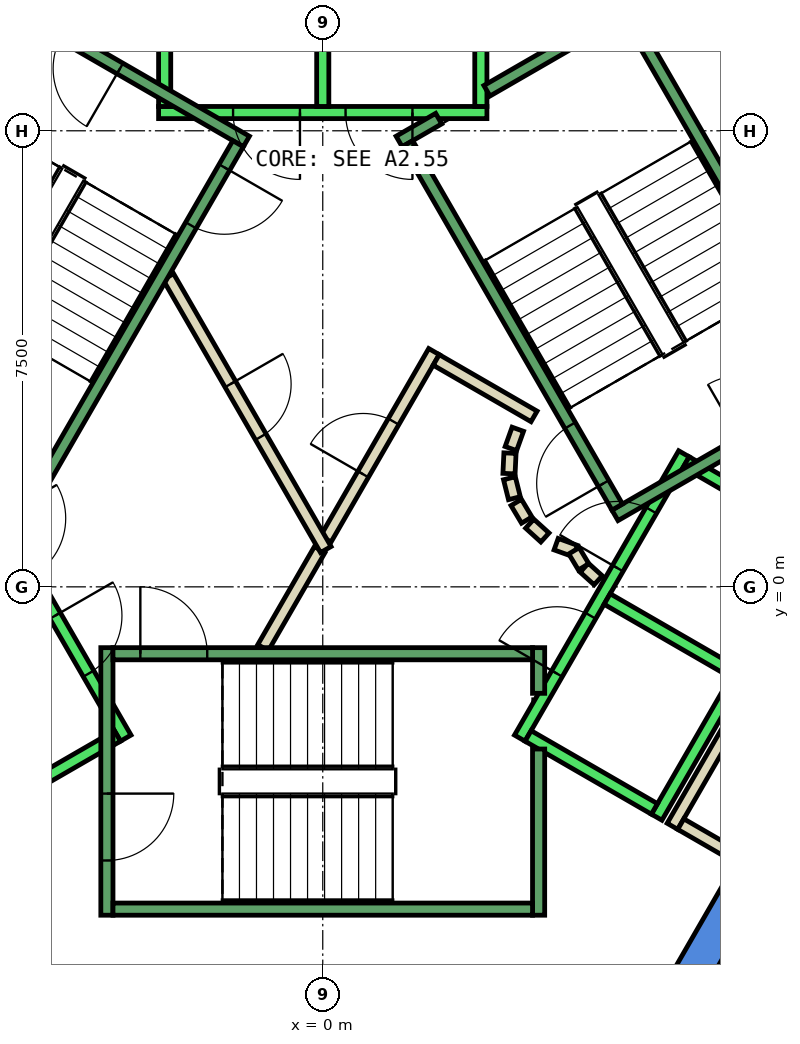
"""IFC4 building model, lengths in metres.
Left out: names, types, materials, properties, quantities, classifications, styles, units other than length and angle.
Written with IfcOpenShell. Run it as: python <this file> out.ifc"""

import sys

from ifc_helpers import new_model, si_unit, direction, frame, frame_2d, origin, place, context, subcontext, project, spatial, polyline, rectangle, outline, extrude, element, fill, save


model = new_model("IFC4")
c1 = context("Model", 3, precision=1e-05, world=origin(), true_north=direction((0.0, 1.0)))
c2 = subcontext(c1, "Body", "Model", "MODEL_VIEW")
j1 = project(units=[si_unit("LENGTHUNIT", "METRE"), si_unit("PLANEANGLEUNIT", "RADIAN")], contexts=[c1])
p1 = place(None, origin())
s1 = spatial("IfcSite", under=j1, at=p1, CompositionType="ELEMENT")
p2 = place(p1, origin())
s2 = spatial("IfcBuilding", under=s1, at=p2, CompositionType="ELEMENT")
p3 = place(p2, frame((0.0, 0.0, 263.0)))
s3 = spatial("IfcBuildingStorey", under=s2, at=p3, CompositionType="ELEMENT", Elevation=263.0)
p4 = place(p3, frame((0.0, 0.0, -0.34)))
e1 = element("IfcWall", 1, at=p4, inside=s3, PredefinedType="SHEAR", context=c2, shape_type="SweptSolid", body=[
    extrude(outline(polyline([(6.786, 10.747), (6.266, 10.447), (10.854, 2.5), (11.547, 2.5), (6.786, 10.747)])), origin(), (0.0, 0.0, 1.0), 3.6),
])
p5 = place(p3, frame((0.0, 0.0, -0.34)))
e2 = element("IfcWall", 2, at=p5, inside=s3, PredefinedType="SHEAR", context=c2, shape_type="SweptSolid", body=[
    extrude(outline(polyline([(5.774, -7.5), (11.547, 2.5), (10.854, 2.5), (5.427, -6.9), (5.774, -7.5)])), origin(), (0.0, 0.0, 1.0), 3.6),
])
p6 = place(p3, frame((5.751, -3.938, 0.0), z_axis=(0.0, 0.0, 1.0), x_axis=(0.500034260056, 0.866005622828, 0.0)))
e3 = element("IfcWall", 3, at=p6, inside=s3, PredefinedType="PARTITIONING", context=c2, shape_type="SweptSolid", body=[
    extrude(rectangle(XDim=5.399, YDim=0.2, at=frame_2d((2.7, 0.0))), origin(), (0.0, 0.0, 1.0), 3.26),
])
p7 = place(p3, frame((6.841, -4.452, 0.0), z_axis=(0.0, 0.0, 1.0), x_axis=(-0.86621513555, 0.499671230855, 0.0)))
e4 = element("IfcWall", 4, at=p7, inside=s3, PredefinedType="PARTITIONING", context=c2, shape_type="SweptSolid", body=[
    extrude(rectangle(XDim=1.1, YDim=0.2, at=frame_2d((0.55, 0.0))), origin(), (0.0, 0.0, 1.0), 3.26),
])
p8 = place(p3, frame((-0.982, -1.0, 0.0), z_axis=(0.0, 0.0, 1.0), x_axis=(0.50024047865, 0.865886518847, 0.0)))
e5 = element("IfcWall", 5, at=p8, inside=s3, PredefinedType="PARTITIONING", context=c2, shape_type="SweptSolid", body=[
    extrude(rectangle(XDim=1.863, YDim=0.2, at=frame_2d((0.931, 0.0))), origin(), (0.0, 0.0, 1.0), 3.26),
])
p9 = place(p3, frame((0.05, 0.787, 0.0), z_axis=(0.0, 0.0, 1.0), x_axis=(0.499954076797, 0.866051915934, 0.0)))
e6 = element("IfcWall", 6, at=p9, inside=s3, PredefinedType="PARTITIONING", context=c2, shape_type="SweptSolid", body=[
    extrude(rectangle(XDim=3.558, YDim=0.2, at=frame_2d((1.779, 0.0))), origin(), (0.0, 0.0, 1.0), 3.26),
])
p10 = place(p9, frame((1.229, 0.0, 0.0)))
e7 = element("IfcOpeningElement", 7, at=p10, cuts=e6, PredefinedType="OPENING", context=c2, shape_type="SweptSolid", body=[
    extrude(rectangle(XDim=1.0, YDim=2.1, at=frame_2d((0.5, 1.05))), frame((0.0, 0.11, 0.0), z_axis=(0.0, -1.0, 0.0), x_axis=(1.0, 0.0, 0.0)), (0.0, 0.0, 1.0), 0.22),
])
p11 = place(p3, frame((1.866, 3.732, 0.0), z_axis=(0.0, 0.0, 1.0), x_axis=(0.866043361281, -0.499968895414, 0.0)))
e8 = element("IfcWall", 8, at=p11, inside=s3, PredefinedType="PARTITIONING", context=c2, shape_type="SweptSolid", body=[
    extrude(rectangle(XDim=1.858, YDim=0.2, at=frame_2d((0.929, 0.0))), origin(), (0.0, 0.0, 1.0), 3.26),
])
p12 = place(p3, frame((3.208, 2.592, 0.0), z_axis=(0.0, 0.0, 1.0), x_axis=(-0.337388820924, -0.941365382578, 0.0)))
e9 = element("IfcWall", 9, at=p12, inside=s3, PredefinedType="PARTITIONING", context=c2, shape_type="SweptSolid", body=[
    extrude(rectangle(XDim=0.338, YDim=0.2, at=frame_2d((0.169, 0.0))), origin(), (0.0, 0.0, 1.0), 3.26),
])
p13 = place(p3, frame((3.079, 2.199, 0.0), z_axis=(0.0, 0.0, 1.0), x_axis=(-0.047771483479, -0.998858290933, 0.0)))
e10 = element("IfcWall", 10, at=p13, inside=s3, PredefinedType="PARTITIONING", context=c2, shape_type="SweptSolid", body=[
    extrude(rectangle(XDim=0.337, YDim=0.2, at=frame_2d((0.169, 0.0))), origin(), (0.0, 0.0, 1.0), 3.26),
])
p14 = place(p3, frame((3.07, 1.786, 0.0), z_axis=(0.0, 0.0, 1.0), x_axis=(0.242705583207, -0.970099994784, 0.0)))
e11 = element("IfcWall", 11, at=p14, inside=s3, PredefinedType="PARTITIONING", context=c2, shape_type="SweptSolid", body=[
    extrude(rectangle(XDim=0.338, YDim=0.2, at=frame_2d((0.169, 0.0))), origin(), (0.0, 0.0, 1.0), 3.26),
])
for number, where, z_axis, x_axis in (
    (12, (3.182, 1.388, 0.0), (0.0, 0.0, 1.0), (0.512, -0.859, 0.0)),
    (13, (3.404, 1.039, 0.0), (0.0, 0.0, 1.0), (0.74, -0.672, 0.0)),
):
    element("IfcWall", number, at=place(p3, frame(where, z_axis=z_axis, x_axis=x_axis)), inside=s3, PredefinedType="PARTITIONING", context=c2, shape_type="SweptSolid", body=[
        extrude(rectangle(XDim=0.338, YDim=0.2, at=frame_2d((0.169, 0.0))), origin(), (0.0, 0.0, 1.0), 3.26),
    ])
p15 = place(p3, frame((3.838, 0.702, 0.0), z_axis=(0.0, 0.0, 1.0), x_axis=(0.941035081519, -0.338308993895, 0.0)))
e14 = element("IfcWall", 14, at=p15, inside=s3, PredefinedType="PARTITIONING", context=c2, shape_type="SweptSolid", body=[
    extrude(rectangle(XDim=0.337, YDim=0.2, at=frame_2d((0.168, 0.0))), origin(), (0.0, 0.0, 1.0), 3.26),
])
p16 = place(p3, frame((4.132, 0.593, 0.0), z_axis=(0.0, 0.0, 1.0), x_axis=(0.513561617048, -0.858052717201, 0.0)))
e15 = element("IfcWall", 15, at=p16, inside=s3, PredefinedType="PARTITIONING", context=c2, shape_type="SweptSolid", body=[
    extrude(rectangle(XDim=0.308, YDim=0.2, at=frame_2d((0.154, 0.0))), origin(), (0.0, 0.0, 1.0), 3.26),
])
p17 = place(p3, frame((4.301, 0.315, 0.0), z_axis=(0.0, 0.0, 1.0), x_axis=(0.741798017506, -0.670623367639, 0.0)))
e16 = element("IfcWall", 16, at=p17, inside=s3, PredefinedType="PARTITIONING", context=c2, shape_type="SweptSolid", body=[
    extrude(rectangle(XDim=0.309, YDim=0.2, at=frame_2d((0.154, 0.0))), origin(), (0.0, 0.0, 1.0), 3.26),
])
p18 = place(p3, frame((-2.54, 5.1, 0.0), z_axis=(0.0, 0.0, 1.0), x_axis=(0.499925051871, -0.866068670783, 0.0)))
e17 = element("IfcWall", 17, at=p18, inside=s3, PredefinedType="PARTITIONING", context=c2, shape_type="SweptSolid", body=[
    extrude(rectangle(XDim=5.181, YDim=0.2, at=frame_2d((2.59, 0.0))), origin(), (0.0, 0.0, 1.0), 3.26),
])
p19 = place(p18, frame((2.04, 0.0, 0.0)))
e18 = element("IfcOpeningElement", 18, at=p19, cuts=e17, PredefinedType="OPENING", context=c2, shape_type="SweptSolid", body=[
    extrude(rectangle(XDim=1.0, YDim=2.1, at=frame_2d((0.5, 1.05))), frame((0.0, 0.11, 0.0), z_axis=(0.0, -1.0, 0.0), x_axis=(1.0, 0.0, 0.0)), (0.0, 0.0, 1.0), 0.22),
])
p20 = place(p3, frame((2.7, 7.8, 0.0), z_axis=(0.0, 0.0, 1.0), x_axis=(-1.0, 0.0, 0.0)))
e19 = element("IfcWall", 19, at=p20, inside=s3, PredefinedType="STANDARD", context=c2, shape_type="SweptSolid", body=[
    extrude(rectangle(XDim=5.4, YDim=0.2, at=frame_2d((2.7, 0.0))), origin(), (0.0, 0.0, 1.0), 3.26),
])
p21 = place(p20, frame((1.225, 0.0, 0.0)))
e20 = element("IfcOpeningElement", 20, at=p21, cuts=e19, PredefinedType="OPENING", context=c2, shape_type="SweptSolid", body=[
    extrude(rectangle(XDim=1.1, YDim=2.1, at=frame_2d((0.55, 1.05))), frame((0.0, 0.11, 0.0), z_axis=(0.0, -1.0, 0.0), x_axis=(1.0, 0.0, 0.0)), (0.0, 0.0, 1.0), 0.22),
])
p22 = place(p20, frame((3.075, 0.0, 0.0)))
e21 = element("IfcOpeningElement", 21, at=p22, cuts=e19, PredefinedType="OPENING", context=c2, shape_type="SweptSolid", body=[
    extrude(rectangle(XDim=1.1, YDim=2.1, at=frame_2d((0.55, 1.05))), frame((0.0, 0.11, 0.0), z_axis=(0.0, -1.0, 0.0), x_axis=(1.0, 0.0, 0.0)), (0.0, 0.0, 1.0), 0.22),
])
for number, where, z_axis, x_axis in (
    (22, (2.6, 7.9, 0.0), (0.0, 0.0, 1.0), (0.0, 1.0, 0.0)),
    (23, (0.0, 7.9, 0.0), (0.0, 0.0, 1.0), (0.0, 1.0, 0.0)),
    (24, (-2.6, 7.9, 0.0), (0.0, 0.0, 1.0), (0.0, 1.0, 0.0)),
):
    element("IfcWall", number, at=place(p3, frame(where, z_axis=z_axis, x_axis=x_axis)), inside=s3, PredefinedType="STANDARD", context=c2, shape_type="SweptSolid", body=[
        extrude(rectangle(XDim=2.4, YDim=0.2, at=frame_2d((1.2, 0.0))), origin(), (0.0, 0.0, 1.0), 3.26),
    ])
p23 = place(p3, frame((-5.94, 2.188, 0.0), z_axis=(0.0, 0.0, 1.0), x_axis=(0.500034260056, -0.866005622828, 0.0)))
e25 = element("IfcWall", 25, at=p23, inside=s3, PredefinedType="STANDARD", context=c2, shape_type="SweptSolid", body=[
    extrude(rectangle(XDim=5.399, YDim=0.2, at=frame_2d((2.7, 0.0))), origin(), (0.0, 0.0, 1.0), 3.26),
])
p24 = place(p23, frame((3.075, 0.0, 0.0)))
e26 = element("IfcOpeningElement", 26, at=p24, cuts=e25, PredefinedType="OPENING", context=c2, shape_type="SweptSolid", body=[
    extrude(rectangle(XDim=1.1, YDim=2.1, at=frame_2d((0.55, 1.05))), frame((0.0, 0.11, 0.0), z_axis=(0.0, -1.0, 0.0), x_axis=(1.0, 0.0, 0.0)), (0.0, 0.0, 1.0), 0.22),
])
p25 = place(p23, frame((1.225, 0.0, 0.0)))
e27 = element("IfcOpeningElement", 27, at=p25, cuts=e25, PredefinedType="OPENING", context=c2, shape_type="SweptSolid", body=[
    extrude(rectangle(XDim=1.1, YDim=2.1, at=frame_2d((0.55, 1.05))), frame((0.0, 0.11, 0.0), z_axis=(0.0, -1.0, 0.0), x_axis=(1.0, 0.0, 0.0)), (0.0, 0.0, 1.0), 0.22),
])
p26 = place(p3, frame((-3.377, -2.452, 0.0), z_axis=(0.0, 0.0, 1.0), x_axis=(-0.865955154139, -0.50012165622, 0.0)))
e28 = element("IfcWall", 28, at=p26, inside=s3, PredefinedType="STANDARD", context=c2, shape_type="SweptSolid", body=[
    extrude(rectangle(XDim=2.4, YDim=0.2, at=frame_2d((1.2, 0.0))), origin(), (0.0, 0.0, 1.0), 3.26),
])
p27 = place(p3, frame((3.24, -2.488, 0.0), z_axis=(0.0, 0.0, 1.0), x_axis=(0.500034260056, 0.866005622828, 0.0)))
e29 = element("IfcWall", 29, at=p27, inside=s3, PredefinedType="STANDARD", context=c2, shape_type="SweptSolid", body=[
    extrude(rectangle(XDim=5.399, YDim=0.2, at=frame_2d((2.7, 0.0))), origin(), (0.0, 0.0, 1.0), 3.26),
])
p28 = place(p27, frame((3.225, 0.0, 0.0)))
e30 = element("IfcOpeningElement", 30, at=p28, cuts=e29, PredefinedType="OPENING", context=c2, shape_type="SweptSolid", body=[
    extrude(rectangle(XDim=1.1, YDim=2.1, at=frame_2d((0.55, 1.05))), frame((0.0, 0.11, 0.0), z_axis=(0.0, -1.0, 0.0), x_axis=(1.0, 0.0, 0.0)), (0.0, 0.0, 1.0), 0.22),
])
p29 = place(p27, frame((1.225, 0.0, 0.0)))
e31 = element("IfcOpeningElement", 31, at=p29, cuts=e29, PredefinedType="OPENING", context=c2, shape_type="SweptSolid", body=[
    extrude(rectangle(XDim=1.1, YDim=2.1, at=frame_2d((0.55, 1.05))), frame((0.0, 0.11, 0.0), z_axis=(0.0, -1.0, 0.0), x_axis=(1.0, 0.0, 0.0)), (0.0, 0.0, 1.0), 0.22),
])
p30 = place(p3, frame((5.492, -3.788, 0.0), z_axis=(0.0, 0.0, 1.0), x_axis=(0.500034260056, 0.866005622828, 0.0)))
e32 = element("IfcWall", 32, at=p30, inside=s3, PredefinedType="STANDARD", context=c2, shape_type="SweptSolid", body=[
    extrude(rectangle(XDim=5.399, YDim=0.2, at=frame_2d((2.7, 0.0))), origin(), (0.0, 0.0, 1.0), 3.26),
])
p31 = place(p3, frame((3.377, -2.452, 0.0), z_axis=(0.0, 0.0, 1.0), x_axis=(0.865955154139, -0.50012165622, 0.0)))
e33 = element("IfcWall", 33, at=p31, inside=s3, PredefinedType="STANDARD", context=c2, shape_type="SweptSolid", body=[
    extrude(rectangle(XDim=2.4, YDim=0.2, at=frame_2d((1.2, 0.0))), origin(), (0.0, 0.0, 1.0), 3.26),
])
for number, where, z_axis, x_axis in (
    (34, (4.677, -0.2, 0.0), (0.0, 0.0, 1.0), (0.866, -0.5, 0.0)),
    (35, (5.977, 2.052, 0.0), (0.0, 0.0, 1.0), (0.866, -0.5, 0.0)),
):
    element("IfcWall", number, at=place(p3, frame(where, z_axis=z_axis, x_axis=x_axis)), inside=s3, PredefinedType="STANDARD", context=c2, shape_type="SweptSolid", body=[
        extrude(rectangle(XDim=2.399, YDim=0.2, at=frame_2d((1.2, 0.0))), origin(), (0.0, 0.0, 1.0), 3.26),
    ])
p32 = place(p3, frame((-3.55, -1.0, 0.0), z_axis=(0.0, 0.0, 1.0), x_axis=(0.0, -1.0, 0.0)))
e36 = element("IfcWall", 36, at=p32, inside=s3, PredefinedType="STANDARD", context=c2, shape_type="SweptSolid", body=[
    extrude(rectangle(XDim=4.4, YDim=0.2, at=frame_2d((2.2, 0.0))), origin(), (0.0, 0.0, 1.0), 3.26),
])
p33 = place(p32, frame((2.4, 0.0, 0.0)))
e37 = element("IfcOpeningElement", 37, at=p33, cuts=e36, PredefinedType="OPENING", context=c2, shape_type="SweptSolid", body=[
    extrude(rectangle(XDim=1.1, YDim=2.2, at=frame_2d((0.55, 1.1))), frame((0.0, 0.11, 0.0), z_axis=(0.0, -1.0, 0.0), x_axis=(1.0, 0.0, 0.0)), (0.0, 0.0, 1.0), 0.22),
])
p34 = place(p3, frame((3.55, -2.667, 0.0), z_axis=(0.0, 0.0, 1.0), x_axis=(0.0, -1.0, 0.0)))
e38 = element("IfcWall", 38, at=p34, inside=s3, PredefinedType="STANDARD", context=c2, shape_type="SweptSolid", body=[
    extrude(rectangle(XDim=2.733, YDim=0.2, at=frame_2d((1.366, 0.0))), origin(), (0.0, 0.0, 1.0), 3.26),
])
p35 = place(p3, frame((3.55, -1.0, 0.0), z_axis=(0.0, 0.0, 1.0), x_axis=(0.0, -1.0, 0.0)))
e39 = element("IfcWall", 39, at=p35, inside=s3, PredefinedType="STANDARD", context=c2, shape_type="SweptSolid", body=[
    extrude(rectangle(XDim=0.751, YDim=0.2, at=frame_2d((0.375, 0.0))), origin(), (0.0, 0.0, 1.0), 3.26),
])
p36 = place(p3, frame((-3.45, -1.1, 0.0), z_axis=(0.0, 0.0, 1.0), x_axis=(1.0, 0.0, 0.0)))
e40 = element("IfcWall", 40, at=p36, inside=s3, PredefinedType="STANDARD", context=c2, shape_type="SweptSolid", body=[
    extrude(rectangle(XDim=6.9, YDim=0.2, at=frame_2d((3.45, 0.0))), origin(), (0.0, 0.0, 1.0), 3.26),
])
p37 = place(p36, frame((0.45, 0.0, 0.0)))
e41 = element("IfcOpeningElement", 41, at=p37, cuts=e40, PredefinedType="OPENING", context=c2, shape_type="SweptSolid", body=[
    extrude(rectangle(XDim=1.1, YDim=2.2, at=frame_2d((0.55, 1.1))), frame((0.0, 0.11, 0.0), z_axis=(0.0, -1.0, 0.0), x_axis=(1.0, 0.0, 0.0)), (0.0, 0.0, 1.0), 0.22),
])
p38 = place(p3, frame((-3.45, -5.3, 0.0), z_axis=(0.0, 0.0, 1.0), x_axis=(1.0, 0.0, 0.0)))
e42 = element("IfcWall", 42, at=p38, inside=s3, PredefinedType="STANDARD", context=c2, shape_type="SweptSolid", body=[
    extrude(rectangle(XDim=6.9, YDim=0.2, at=frame_2d((3.45, 0.0))), origin(), (0.0, 0.0, 1.0), 3.26),
])
p39 = place(p3, frame((4.806, 1.176, 0.0), z_axis=(0.0, 0.0, 1.0), x_axis=(0.866059941101, 0.499940174841, 0.0)))
e43 = element("IfcWall", 43, at=p39, inside=s3, PredefinedType="STANDARD", context=c2, shape_type="SweptSolid", body=[
    extrude(rectangle(XDim=4.4, YDim=0.2, at=frame_2d((2.2, 0.0))), origin(), (0.0, 0.0, 1.0), 3.26),
])
p40 = place(p39, frame((2.4, 0.0, 0.0)))
e44 = element("IfcOpeningElement", 44, at=p40, cuts=e43, PredefinedType="OPENING", context=c2, shape_type="SweptSolid", body=[
    extrude(rectangle(XDim=1.1, YDim=2.2, at=frame_2d((0.55, 1.1))), frame((0.0, 0.11, 0.0), z_axis=(0.0, -1.0, 0.0), x_axis=(1.0, 0.0, 0.0)), (0.0, 0.0, 1.0), 0.22),
])
p41 = place(p3, frame((2.7, 8.158, 0.0), z_axis=(0.0, 0.0, 1.0), x_axis=(0.86611865017, 0.499838457731, 0.0)))
e45 = element("IfcWall", 45, at=p41, inside=s3, PredefinedType="STANDARD", context=c2, shape_type="SweptSolid", body=[
    extrude(rectangle(XDim=2.733, YDim=0.2, at=frame_2d((1.366, 0.0))), origin(), (0.0, 0.0, 1.0), 3.26),
])
p42 = place(p3, frame((1.256, 7.324, 0.0), z_axis=(0.0, 0.0, 1.0), x_axis=(0.865915093549, 0.500191014278, 0.0)))
e46 = element("IfcWall", 46, at=p42, inside=s3, PredefinedType="STANDARD", context=c2, shape_type="SweptSolid", body=[
    extrude(rectangle(XDim=0.752, YDim=0.2, at=frame_2d((0.376, 0.0))), origin(), (0.0, 0.0, 1.0), 3.26),
])
p43 = place(p3, frame((4.843, 1.312, 0.0), z_axis=(0.0, 0.0, 1.0), x_axis=(-0.499963383562, 0.866046543262, 0.0)))
e47 = element("IfcWall", 47, at=p43, inside=s3, PredefinedType="STANDARD", context=c2, shape_type="SweptSolid", body=[
    extrude(rectangle(XDim=6.9, YDim=0.2, at=frame_2d((3.45, 0.0))), origin(), (0.0, 0.0, 1.0), 3.26),
])
p44 = place(p43, frame((0.45, 0.0, 0.0)))
e48 = element("IfcOpeningElement", 48, at=p44, cuts=e47, PredefinedType="OPENING", context=c2, shape_type="SweptSolid", body=[
    extrude(rectangle(XDim=1.1, YDim=2.2, at=frame_2d((0.55, 1.1))), frame((0.0, 0.11, 0.0), z_axis=(0.0, -1.0, 0.0), x_axis=(1.0, 0.0, 0.0)), (0.0, 0.0, 1.0), 0.22),
])
p45 = place(p3, frame((8.48, 3.412, 0.0), z_axis=(0.0, 0.0, 1.0), x_axis=(-0.499978703459, 0.866037698999, 0.0)))
e49 = element("IfcWall", 49, at=p45, inside=s3, PredefinedType="STANDARD", context=c2, shape_type="SweptSolid", body=[
    extrude(rectangle(XDim=6.9, YDim=0.2, at=frame_2d((3.45, 0.0))), origin(), (0.0, 0.0, 1.0), 3.26),
])
p46 = place(p3, frame((-1.256, 7.324, 0.0), z_axis=(0.0, 0.0, 1.0), x_axis=(-0.866046073146, 0.499964197906, 0.0)))
e50 = element("IfcWall", 50, at=p46, inside=s3, PredefinedType="STANDARD", context=c2, shape_type="SweptSolid", body=[
    extrude(rectangle(XDim=4.4, YDim=0.2, at=frame_2d((2.2, 0.0))), origin(), (0.0, 0.0, 1.0), 3.26),
])
p47 = place(p46, frame((2.4, 0.0, 0.0)))
e51 = element("IfcOpeningElement", 51, at=p47, cuts=e50, PredefinedType="OPENING", context=c2, shape_type="SweptSolid", body=[
    extrude(rectangle(XDim=1.1, YDim=2.2, at=frame_2d((0.55, 1.1))), frame((0.0, 0.11, 0.0), z_axis=(0.0, -1.0, 0.0), x_axis=(1.0, 0.0, 0.0)), (0.0, 0.0, 1.0), 0.22),
])
p48 = place(p3, frame((-1.393, 7.288, 0.0), z_axis=(0.0, 0.0, 1.0), x_axis=(-0.499963383562, -0.866046543262, 0.0)))
e52 = element("IfcWall", 52, at=p48, inside=s3, PredefinedType="STANDARD", context=c2, shape_type="SweptSolid", body=[
    extrude(rectangle(XDim=6.9, YDim=0.2, at=frame_2d((3.45, 0.0))), origin(), (0.0, 0.0, 1.0), 3.26),
])
p49 = place(p48, frame((0.45, 0.0, 0.0)))
e53 = element("IfcOpeningElement", 53, at=p49, cuts=e52, PredefinedType="OPENING", context=c2, shape_type="SweptSolid", body=[
    extrude(rectangle(XDim=1.1, YDim=2.2, at=frame_2d((0.55, 1.1))), frame((0.0, 0.11, 0.0), z_axis=(0.0, -1.0, 0.0), x_axis=(1.0, 0.0, 0.0)), (0.0, 0.0, 1.0), 0.22),
])
p50 = place(p10, origin())
e54 = element("IfcDoor", 54, at=p50, inside=s3, OperationType="SINGLE_SWING_RIGHT", PredefinedType="DOOR", context=c2, shape_type="SweptSolid", body=[
    extrude(rectangle(XDim=1.0, YDim=2.1, at=frame_2d((0.5, 1.05))), frame((0.0, 0.025, 0.0), z_axis=(0.0, -1.0, 0.0), x_axis=(1.0, 0.0, 0.0)), (0.0, 0.0, 1.0), 0.05),
])
fill(e7, e54)
p51 = place(p19, origin())
e55 = element("IfcDoor", 55, at=p51, inside=s3, OperationType="SINGLE_SWING_RIGHT", PredefinedType="DOOR", context=c2, shape_type="SweptSolid", body=[
    extrude(rectangle(XDim=1.0, YDim=2.1, at=frame_2d((0.5, 1.05))), frame((0.0, 0.025, 0.0), z_axis=(0.0, -1.0, 0.0), x_axis=(1.0, 0.0, 0.0)), (0.0, 0.0, 1.0), 0.05),
])
fill(e18, e55)
p52 = place(p21, origin())
e56 = element("IfcDoor", 56, at=p52, inside=s3, OperationType="SLIDING_TO_LEFT", PredefinedType="DOOR", context=c2, shape_type="SweptSolid", body=[
    extrude(rectangle(XDim=1.1, YDim=2.1, at=frame_2d((0.55, 1.05))), frame((0.0, 0.025, 0.0), z_axis=(0.0, -1.0, 0.0), x_axis=(1.0, 0.0, 0.0)), (0.0, 0.0, 1.0), 0.05),
])
fill(e20, e56)
p53 = place(p22, origin())
e57 = element("IfcDoor", 57, at=p53, inside=s3, OperationType="SLIDING_TO_LEFT", PredefinedType="DOOR", context=c2, shape_type="SweptSolid", body=[
    extrude(rectangle(XDim=1.1, YDim=2.1, at=frame_2d((0.55, 1.05))), frame((0.0, 0.025, 0.0), z_axis=(0.0, -1.0, 0.0), x_axis=(1.0, 0.0, 0.0)), (0.0, 0.0, 1.0), 0.05),
])
fill(e21, e57)
p54 = place(p28, origin())
e58 = element("IfcDoor", 58, at=p54, inside=s3, OperationType="SLIDING_TO_LEFT", PredefinedType="DOOR", context=c2, shape_type="SweptSolid", body=[
    extrude(rectangle(XDim=1.1, YDim=2.1, at=frame_2d((0.55, 1.05))), frame((0.0, 0.025, 0.0), z_axis=(0.0, -1.0, 0.0), x_axis=(1.0, 0.0, 0.0)), (0.0, 0.0, 1.0), 0.05),
])
fill(e30, e58)
p55 = place(p24, origin())
e59 = element("IfcDoor", 59, at=p55, inside=s3, OperationType="SLIDING_TO_LEFT", PredefinedType="DOOR", context=c2, shape_type="SweptSolid", body=[
    extrude(rectangle(XDim=1.1, YDim=2.1, at=frame_2d((0.55, 1.05))), frame((0.0, 0.025, 0.0), z_axis=(0.0, -1.0, 0.0), x_axis=(1.0, 0.0, 0.0)), (0.0, 0.0, 1.0), 0.05),
])
fill(e26, e59)
p56 = place(p29, origin())
e60 = element("IfcDoor", 60, at=p56, inside=s3, OperationType="SLIDING_TO_LEFT", PredefinedType="DOOR", context=c2, shape_type="SweptSolid", body=[
    extrude(rectangle(XDim=1.1, YDim=2.1, at=frame_2d((0.55, 1.05))), frame((0.0, 0.025, 0.0), z_axis=(0.0, -1.0, 0.0), x_axis=(1.0, 0.0, 0.0)), (0.0, 0.0, 1.0), 0.05),
])
fill(e31, e60)
p57 = place(p37, origin())
e61 = element("IfcDoor", 61, at=p57, inside=s3, OperationType="SINGLE_SWING_LEFT", PredefinedType="DOOR", context=c2, shape_type="SweptSolid", body=[
    extrude(rectangle(XDim=1.1, YDim=2.2, at=frame_2d((0.55, 1.1))), frame((0.0, 0.025, 0.0), z_axis=(0.0, -1.0, 0.0), x_axis=(1.0, 0.0, 0.0)), (0.0, 0.0, 1.0), 0.05),
])
fill(e41, e61)
p58 = place(p33, origin())
e62 = element("IfcDoor", 62, at=p58, inside=s3, OperationType="SINGLE_SWING_LEFT", PredefinedType="DOOR", context=c2, shape_type="SweptSolid", body=[
    extrude(rectangle(XDim=1.1, YDim=2.2, at=frame_2d((0.55, 1.1))), frame((0.0, 0.025, 0.0), z_axis=(0.0, -1.0, 0.0), x_axis=(1.0, 0.0, 0.0)), (0.0, 0.0, 1.0), 0.05),
])
fill(e37, e62)
p59 = place(p44, origin())
e63 = element("IfcDoor", 63, at=p59, inside=s3, OperationType="SINGLE_SWING_LEFT", PredefinedType="DOOR", context=c2, shape_type="SweptSolid", body=[
    extrude(rectangle(XDim=1.1, YDim=2.2, at=frame_2d((0.55, 1.1))), frame((0.0, 0.025, 0.0), z_axis=(0.0, -1.0, 0.0), x_axis=(1.0, 0.0, 0.0)), (0.0, 0.0, 1.0), 0.05),
])
fill(e48, e63)
p60 = place(p49, origin())
e64 = element("IfcDoor", 64, at=p60, inside=s3, OperationType="SINGLE_SWING_LEFT", PredefinedType="DOOR", context=c2, shape_type="SweptSolid", body=[
    extrude(rectangle(XDim=1.1, YDim=2.2, at=frame_2d((0.55, 1.1))), frame((0.0, 0.025, 0.0), z_axis=(0.0, -1.0, 0.0), x_axis=(1.0, 0.0, 0.0)), (0.0, 0.0, 1.0), 0.05),
])
fill(e53, e64)
p61 = place(p47, origin())
e65 = element("IfcDoor", 65, at=p61, inside=s3, OperationType="SINGLE_SWING_LEFT", PredefinedType="DOOR", context=c2, shape_type="SweptSolid", body=[
    extrude(rectangle(XDim=1.1, YDim=2.2, at=frame_2d((0.55, 1.1))), frame((0.0, 0.025, 0.0), z_axis=(0.0, -1.0, 0.0), x_axis=(1.0, 0.0, 0.0)), (0.0, 0.0, 1.0), 0.05),
])
fill(e51, e65)
save(model, sys.argv[1])
